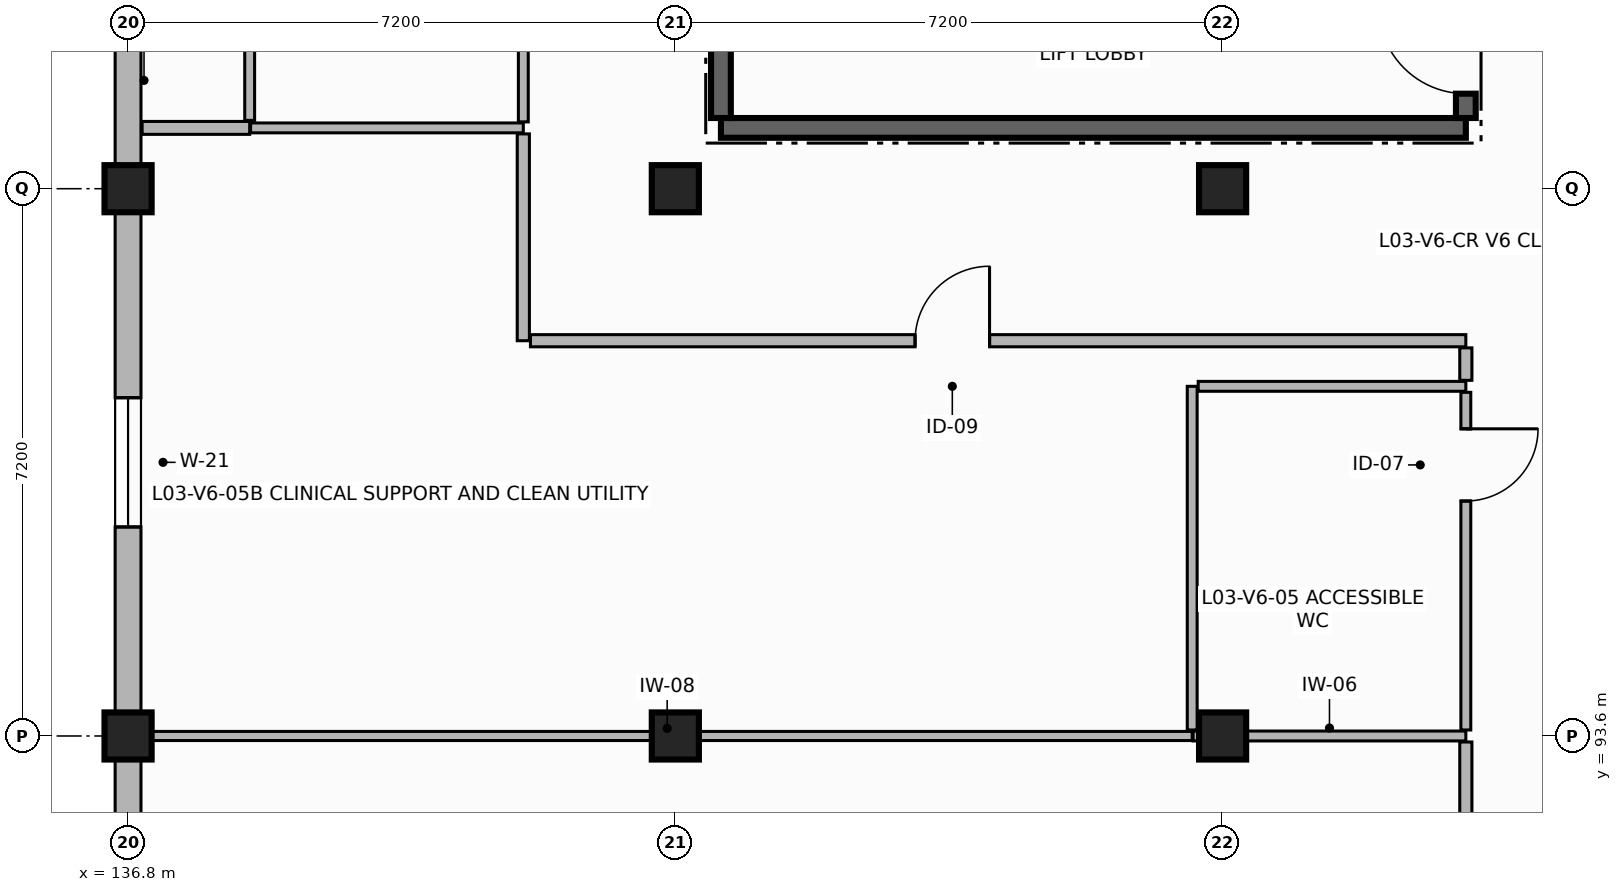
"""IFC4 building model, lengths in metres.
Left out: names, types, materials, properties, quantities, classifications, styles, units other than length and angle.
Written with IfcOpenShell. Run it as: python <this file> out.ifc"""

import sys

from ifc_helpers import new_model, si_unit, direction, frame, frame_2d, origin, origin_2d, place, context, subcontext, project, spatial, rectangle, extrude, element, fill, save


model = new_model("IFC4")
c1 = context("Model", 3, precision=1e-05, world=origin(), true_north=direction((0.0, 1.0)))
c2 = subcontext(c1, "Body", "Model", "MODEL_VIEW")
j1 = project(units=[si_unit("LENGTHUNIT", "METRE"), si_unit("PLANEANGLEUNIT", "RADIAN")], contexts=[c1])
p1 = place(None, origin())
s1 = spatial("IfcSite", under=j1, at=p1, CompositionType="ELEMENT")
p2 = place(p1, origin())
s2 = spatial("IfcBuilding", under=s1, at=p2, CompositionType="ELEMENT")
p3 = place(p2, frame((0.0, 0.0, 12.3)))
s3 = spatial("IfcBuildingStorey", under=s2, at=p3, CompositionType="ELEMENT", Elevation=12.3)
for number, where, z_axis, x_axis in (
    (1, (136.8, 93.6, 0.0), (0.0, 0.0, 1.0), (1.0, 0.0, 0.0)),
    (2, (136.8, 100.8, 0.0), (0.0, 0.0, 1.0), (1.0, 0.0, 0.0)),
    (3, (144.0, 93.6, 0.0), (0.0, 0.0, 1.0), (1.0, 0.0, 0.0)),
    (4, (144.0, 100.8, 0.0), (0.0, 0.0, 1.0), (1.0, 0.0, 0.0)),
    (5, (151.2, 93.6, 0.0), (0.0, 0.0, 1.0), (1.0, 0.0, 0.0)),
    (6, (151.2, 100.8, 0.0), (0.0, 0.0, 1.0), (1.0, 0.0, 0.0)),
):
    element("IfcColumn", number, at=place(p3, frame(where, z_axis=z_axis, x_axis=x_axis)), inside=s3, PredefinedType="COLUMN", context=c2, shape_type="SweptSolid", body=[
        extrude(rectangle(XDim=0.62, YDim=0.62, at=origin_2d()), origin(), (0.0, 0.0, 1.0), 3.38),
    ])
p4 = place(p3, frame((136.8, 108.0, 0.0), z_axis=(0.0, 0.0, 1.0), x_axis=(0.0, -1.0, 0.0)))
e7 = element("IfcWall", 7, at=p4, inside=s3, PredefinedType="SOLIDWALL", context=c2, shape_type="SweptSolid", body=[
    extrude(rectangle(XDim=7.2, YDim=0.34, at=frame_2d((3.6, 0.0))), origin(), (0.0, 0.0, 1.0), 2.71),
])
p5 = place(p4, frame((2.65, 0.0, 0.85)))
e8 = element("IfcOpeningElement", 8, at=p5, cuts=e7, PredefinedType="OPENING", context=c2, shape_type="SweptSolid", body=[
    extrude(rectangle(XDim=1.7, YDim=1.65, at=frame_2d((0.85, 0.825))), frame((0.0, 0.18, 0.0), z_axis=(0.0, -1.0, 0.0), x_axis=(1.0, 0.0, 0.0)), (0.0, 0.0, 1.0), 0.36),
])
p6 = place(p3, frame((136.8, 100.8, 0.0), z_axis=(0.0, 0.0, 1.0), x_axis=(0.0, -1.0, 0.0)))
e9 = element("IfcWall", 9, at=p6, inside=s3, PredefinedType="SOLIDWALL", context=c2, shape_type="SweptSolid", body=[
    extrude(rectangle(XDim=7.2, YDim=0.34, at=frame_2d((3.6, 0.0))), origin(), (0.0, 0.0, 1.0), 2.71),
])
p7 = place(p6, frame((2.75, 0.0, 0.85)))
e10 = element("IfcOpeningElement", 10, at=p7, cuts=e9, PredefinedType="OPENING", context=c2, shape_type="SweptSolid", body=[
    extrude(rectangle(XDim=1.7, YDim=1.65, at=frame_2d((0.85, 0.825))), frame((0.0, 0.18, 0.0), z_axis=(0.0, -1.0, 0.0), x_axis=(1.0, 0.0, 0.0)), (0.0, 0.0, 1.0), 0.36),
])
p8 = place(p3, frame((136.8, 93.6, 0.0), z_axis=(0.0, 0.0, 1.0), x_axis=(0.0, -1.0, 0.0)))
e11 = element("IfcWall", 11, at=p8, inside=s3, PredefinedType="SOLIDWALL", context=c2, shape_type="SweptSolid", body=[
    extrude(rectangle(XDim=7.2, YDim=0.34, at=frame_2d((3.6, 0.0))), origin(), (0.0, 0.0, 1.0), 2.71),
])
p9 = place(p8, frame((2.75, 0.0, 0.85)))
e12 = element("IfcOpeningElement", 12, at=p9, cuts=e11, PredefinedType="OPENING", context=c2, shape_type="SweptSolid", body=[
    extrude(rectangle(XDim=1.7, YDim=1.65, at=frame_2d((0.85, 0.825))), frame((0.0, 0.18, 0.0), z_axis=(0.0, -1.0, 0.0), x_axis=(1.0, 0.0, 0.0)), (0.0, 0.0, 1.0), 0.36),
])
p10 = place(p3, frame((144.6, 101.6, 0.0), z_axis=(0.0, 0.0, 1.0), x_axis=(1.0, 0.0, 0.0)))
e13 = element("IfcWall", 13, at=p10, inside=s3, PredefinedType="SHEAR", context=c2, shape_type="SweptSolid", body=[
    extrude(rectangle(XDim=9.8, YDim=0.26, at=frame_2d((4.9, 0.0))), origin(), (0.0, 0.0, 1.0), 3.38),
])
p11 = place(p3, frame((154.4, 101.73, 0.0), z_axis=(0.0, 0.0, 1.0), x_axis=(0.0, 1.0, 0.0)))
e14 = element("IfcWall", 14, at=p11, inside=s3, PredefinedType="SHEAR", context=c2, shape_type="SweptSolid", body=[
    extrude(rectangle(XDim=5.54, YDim=0.26, at=frame_2d((2.77, 0.0))), origin(), (0.0, 0.0, 1.0), 3.38),
])
p12 = place(p11, frame((0.32, 0.0, 0.0)))
e15 = element("IfcOpeningElement", 15, at=p12, cuts=e14, PredefinedType="OPENING", context=c2, shape_type="SweptSolid", body=[
    extrude(rectangle(XDim=1.15, YDim=2.2, at=frame_2d((0.575, 1.1))), frame((0.0, 0.14, 0.0), z_axis=(0.0, -1.0, 0.0), x_axis=(1.0, 0.0, 0.0)), (0.0, 0.0, 1.0), 0.28),
])
p13 = place(p3, frame((144.6, 107.27, 0.0), z_axis=(0.0, 0.0, 1.0), x_axis=(0.0, -1.0, 0.0)))
e16 = element("IfcWall", 16, at=p13, inside=s3, PredefinedType="SHEAR", context=c2, shape_type="SweptSolid", body=[
    extrude(rectangle(XDim=5.54, YDim=0.26, at=frame_2d((2.77, 0.0))), origin(), (0.0, 0.0, 1.0), 3.38),
])
p14 = place(p3, frame((136.985, 93.6, 0.0), z_axis=(0.0, 0.0, 1.0), x_axis=(1.0, 0.0, 0.0)))
e17 = element("IfcWall", 17, at=p14, inside=s3, PredefinedType="PARTITIONING", context=c2, shape_type="SweptSolid", body=[
    extrude(rectangle(XDim=13.815, YDim=0.12, at=frame_2d((6.907, 0.0))), origin(), (0.0, 0.0, 1.0), 2.69),
])
p15 = place(p3, frame((150.812, 93.6, 0.0), z_axis=(0.0, 0.0, 1.0), x_axis=(1.0, 0.0, 0.0)))
e18 = element("IfcWall", 18, at=p15, inside=s3, PredefinedType="PARTITIONING", context=c2, shape_type="SweptSolid", body=[
    extrude(rectangle(XDim=3.588, YDim=0.13, at=frame_2d((1.794, 0.0))), origin(), (0.0, 0.0, 1.0), 2.69),
])
p16 = place(p3, frame((154.4, 93.521, 0.0), z_axis=(0.0, 0.0, 1.0), x_axis=(0.0, -1.0, 0.0)))
e19 = element("IfcWall", 19, at=p16, inside=s3, PredefinedType="PARTITIONING", context=c2, shape_type="SweptSolid", body=[
    extrude(rectangle(XDim=7.022, YDim=0.16, at=frame_2d((3.511, 0.0))), origin(), (0.0, 0.0, 1.0), 2.69),
])
p17 = place(p16, frame((3.001, 0.0, 0.0)))
e20 = element("IfcOpeningElement", 20, at=p17, cuts=e19, PredefinedType="OPENING", context=c2, shape_type="SweptSolid", body=[
    extrude(rectangle(XDim=1.02, YDim=2.15, at=frame_2d((0.51, 1.075))), frame((0.0, 0.09, 0.0), z_axis=(0.0, -1.0, 0.0), x_axis=(1.0, 0.0, 0.0)), (0.0, 0.0, 1.0), 0.18),
])
p18 = place(p3, frame((150.8, 93.679, 0.0), z_axis=(0.0, 0.0, 1.0), x_axis=(0.0, 1.0, 0.0)))
e21 = element("IfcWall", 21, at=p18, inside=s3, PredefinedType="PARTITIONING", context=c2, shape_type="SweptSolid", body=[
    extrude(rectangle(XDim=4.521, YDim=0.13, at=frame_2d((2.26, 0.0))), origin(), (0.0, 0.0, 1.0), 2.69),
])
p19 = place(p3, frame((150.879, 98.2, 0.0), z_axis=(0.0, 0.0, 1.0), x_axis=(1.0, 0.0, 0.0)))
e22 = element("IfcWall", 22, at=p19, inside=s3, PredefinedType="PARTITIONING", context=c2, shape_type="SweptSolid", body=[
    extrude(rectangle(XDim=3.521, YDim=0.13, at=frame_2d((1.76, 0.0))), origin(), (0.0, 0.0, 1.0), 2.69),
])
p20 = place(p3, frame((154.4, 98.121, 0.0), z_axis=(0.0, 0.0, 1.0), x_axis=(0.0, -1.0, 0.0)))
e23 = element("IfcWall", 23, at=p20, inside=s3, PredefinedType="PARTITIONING", context=c2, shape_type="SweptSolid", body=[
    extrude(rectangle(XDim=4.442, YDim=0.13, at=frame_2d((2.221, 0.0))), origin(), (0.0, 0.0, 1.0), 2.69),
])
p21 = place(p20, frame((0.48, 0.0, 0.0)))
e24 = element("IfcOpeningElement", 24, at=p21, cuts=e23, PredefinedType="OPENING", context=c2, shape_type="SweptSolid", body=[
    extrude(rectangle(XDim=0.95, YDim=2.1, at=frame_2d((0.475, 1.05))), frame((0.0, 0.075, 0.0), z_axis=(0.0, -1.0, 0.0), x_axis=(1.0, 0.0, 0.0)), (0.0, 0.0, 1.0), 0.15),
])
p22 = place(p3, frame((136.985, 101.6, 0.0), z_axis=(0.0, 0.0, 1.0), x_axis=(1.0, 0.0, 0.0)))
e25 = element("IfcWall", 25, at=p22, inside=s3, PredefinedType="PARTITIONING", context=c2, shape_type="SweptSolid", body=[
    extrude(rectangle(XDim=1.415, YDim=0.17, at=frame_2d((0.708, 0.0))), origin(), (0.0, 0.0, 1.0), 2.69),
])
p23 = place(p3, frame((138.412, 101.6, 0.0), z_axis=(0.0, 0.0, 1.0), x_axis=(1.0, 0.0, 0.0)))
e26 = element("IfcWall", 26, at=p23, inside=s3, PredefinedType="PARTITIONING", context=c2, shape_type="SweptSolid", body=[
    extrude(rectangle(XDim=3.588, YDim=0.13, at=frame_2d((1.794, 0.0))), origin(), (0.0, 0.0, 1.0), 2.69),
])
p24 = place(p3, frame((142.0, 101.521, 0.0), z_axis=(0.0, 0.0, 1.0), x_axis=(0.0, -1.0, 0.0)))
e27 = element("IfcWall", 27, at=p24, inside=s3, PredefinedType="PARTITIONING", context=c2, shape_type="SweptSolid", body=[
    extrude(rectangle(XDim=2.721, YDim=0.16, at=frame_2d((1.36, 0.0))), origin(), (0.0, 0.0, 1.0), 2.69),
])
p25 = place(p3, frame((142.094, 98.8, 0.0), z_axis=(0.0, 0.0, 1.0), x_axis=(1.0, 0.0, 0.0)))
e28 = element("IfcWall", 28, at=p25, inside=s3, PredefinedType="PARTITIONING", context=c2, shape_type="SweptSolid", body=[
    extrude(rectangle(XDim=12.306, YDim=0.16, at=frame_2d((6.153, 0.0))), origin(), (0.0, 0.0, 1.0), 2.69),
])
p26 = place(p25, frame((5.06, 0.0, 0.0)))
e29 = element("IfcOpeningElement", 29, at=p26, cuts=e28, PredefinedType="OPENING", context=c2, shape_type="SweptSolid", body=[
    extrude(rectangle(XDim=0.98, YDim=2.15, at=frame_2d((0.49, 1.075))), frame((0.0, 0.09, 0.0), z_axis=(0.0, -1.0, 0.0), x_axis=(1.0, 0.0, 0.0)), (0.0, 0.0, 1.0), 0.18),
])
p27 = place(p3, frame((154.4, 98.706, 0.0), z_axis=(0.0, 0.0, 1.0), x_axis=(0.0, -1.0, 0.0)))
e30 = element("IfcWall", 30, at=p27, inside=s3, PredefinedType="PARTITIONING", context=c2, shape_type="SweptSolid", body=[
    extrude(rectangle(XDim=0.427, YDim=0.16, at=frame_2d((0.213, 0.0))), origin(), (0.0, 0.0, 1.0), 2.69),
])
p28 = place(p3, frame((142.0, 106.121, 0.0), z_axis=(0.0, 0.0, 1.0), x_axis=(0.0, -1.0, 0.0)))
e31 = element("IfcWall", 31, at=p28, inside=s3, PredefinedType="PARTITIONING", context=c2, shape_type="SweptSolid", body=[
    extrude(rectangle(XDim=4.442, YDim=0.13, at=frame_2d((2.221, 0.0))), origin(), (0.0, 0.0, 1.0), 2.69),
])
p29 = place(p28, frame((1.341, 0.0, 0.0)))
e32 = element("IfcOpeningElement", 32, at=p29, cuts=e31, PredefinedType="OPENING", context=c2, shape_type="SweptSolid", body=[
    extrude(rectangle(XDim=0.9, YDim=2.1, at=frame_2d((0.45, 1.05))), frame((0.0, 0.075, 0.0), z_axis=(0.0, -1.0, 0.0), x_axis=(1.0, 0.0, 0.0)), (0.0, 0.0, 1.0), 0.15),
])
p30 = place(p3, frame((138.4, 101.699, 0.0), z_axis=(0.0, 0.0, 1.0), x_axis=(0.0, 1.0, 0.0)))
e33 = element("IfcWall", 33, at=p30, inside=s3, PredefinedType="PARTITIONING", context=c2, shape_type="SweptSolid", body=[
    extrude(rectangle(XDim=4.422, YDim=0.13, at=frame_2d((2.211, 0.0))), origin(), (0.0, 0.0, 1.0), 2.69),
])
p31 = place(p7, origin())
e34 = element("IfcWindow", 34, at=p31, inside=s3, PartitioningType="SINGLE_PANEL", PredefinedType="WINDOW", context=c2, shape_type="SweptSolid", body=[
    extrude(rectangle(XDim=1.7, YDim=1.65, at=frame_2d((0.85, 0.825))), frame((0.0, 0.03, 0.0), z_axis=(0.0, -1.0, 0.0), x_axis=(1.0, 0.0, 0.0)), (0.0, 0.0, 1.0), 0.06),
])
fill(e10, e34)
p32 = place(p12, origin())
e35 = element("IfcDoor", 35, at=p32, inside=s3, OperationType="SINGLE_SWING_RIGHT", PredefinedType="DOOR", context=c2, shape_type="SweptSolid", body=[
    extrude(rectangle(XDim=1.15, YDim=2.2, at=frame_2d((0.575, 1.1))), frame((0.0, 0.025, 0.0), z_axis=(0.0, -1.0, 0.0), x_axis=(1.0, 0.0, 0.0)), (0.0, 0.0, 1.0), 0.05),
])
fill(e15, e35)
p33 = place(p21, origin())
e36 = element("IfcDoor", 36, at=p33, inside=s3, OperationType="SINGLE_SWING_LEFT", PredefinedType="DOOR", context=c2, shape_type="SweptSolid", body=[
    extrude(rectangle(XDim=0.95, YDim=2.1, at=frame_2d((0.475, 1.05))), frame((0.0, 0.025, 0.0), z_axis=(0.0, -1.0, 0.0), x_axis=(1.0, 0.0, 0.0)), (0.0, 0.0, 1.0), 0.05),
])
fill(e24, e36)
p34 = place(p26, origin())
e37 = element("IfcDoor", 37, at=p34, inside=s3, OperationType="SINGLE_SWING_RIGHT", PredefinedType="DOOR", context=c2, shape_type="SweptSolid", body=[
    extrude(rectangle(XDim=0.98, YDim=2.15, at=frame_2d((0.49, 1.075))), frame((0.0, 0.025, 0.0), z_axis=(0.0, -1.0, 0.0), x_axis=(1.0, 0.0, 0.0)), (0.0, 0.0, 1.0), 0.05),
])
fill(e29, e37)
save(model, sys.argv[1])
